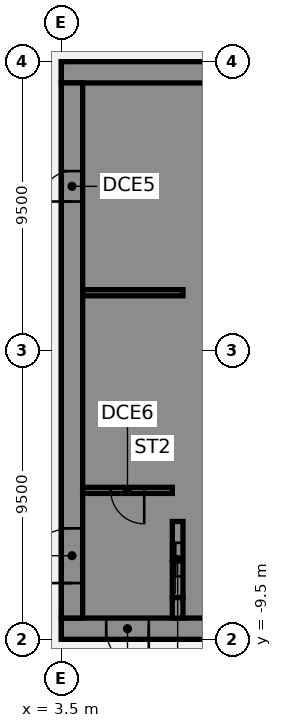
"""IFC4 building model, lengths in metres.
Left out: names, types, materials, properties, quantities, classifications, styles, units other than length and angle.
Written with IfcOpenShell. Run it as: python <this file> out.ifc"""

import sys

from ifc_helpers import new_model, si_unit, direction, frame, frame_2d, origin, place, context, subcontext, project, spatial, polyline, rectangle, outline, extrude, element, fill, save


model = new_model("IFC4")
c1 = context("Model", 3, precision=1e-05, world=origin(), true_north=direction((0.0, 1.0)))
c2 = subcontext(c1, "Body", "Model", "MODEL_VIEW")
j1 = project(units=[si_unit("LENGTHUNIT", "METRE"), si_unit("PLANEANGLEUNIT", "RADIAN")], contexts=[c1])
p1 = place(None, origin())
s1 = spatial("IfcSite", under=j1, at=p1, CompositionType="ELEMENT")
p2 = place(p1, origin())
s2 = spatial("IfcBuilding", under=s1, at=p2, CompositionType="ELEMENT")
p3 = place(p2, frame((0.0, 0.0, 67.75)))
s3 = spatial("IfcBuildingStorey", under=s2, at=p3, CompositionType="ELEMENT", Elevation=67.75)
p4 = place(p3, frame((16.5, -9.15, 0.0), z_axis=(0.0, 0.0, 1.0), x_axis=(-1.0, 0.0, 0.0)))
e1 = element("IfcWall", 1, at=p4, inside=s3, PredefinedType="SHEAR", context=c2, shape_type="SweptSolid", body=[
    extrude(rectangle(XDim=13.0, YDim=0.7, at=frame_2d((6.5, 0.0))), origin(), (0.0, 0.0, 1.0), 3.61),
])
p5 = place(p4, frame((4.15, 0.0, 0.0)))
e2 = element("IfcOpeningElement", 2, at=p5, cuts=e1, PredefinedType="OPENING", context=c2, shape_type="SweptSolid", body=[
    extrude(rectangle(XDim=1.4, YDim=2.1, at=frame_2d((0.7, 1.05))), frame((0.0, 0.36, 0.0), z_axis=(0.0, -1.0, 0.0), x_axis=(1.0, 0.0, 0.0)), (0.0, 0.0, 1.0), 0.72),
])
p6 = place(p4, frame((10.125, 0.0, 0.0)))
e3 = element("IfcOpeningElement", 3, at=p6, cuts=e1, PredefinedType="OPENING", context=c2, shape_type="SweptSolid", body=[
    extrude(rectangle(XDim=1.4, YDim=2.1, at=frame_2d((0.7, 1.05))), frame((0.0, 0.36, 0.0), z_axis=(0.0, -1.0, 0.0), x_axis=(1.0, 0.0, 0.0)), (0.0, 0.0, 1.0), 0.72),
])
p7 = place(p3, frame((16.5, 9.15, 0.0), z_axis=(0.0, 0.0, 1.0), x_axis=(-1.0, 0.0, 0.0)))
e4 = element("IfcWall", 4, at=p7, inside=s3, PredefinedType="SHEAR", context=c2, shape_type="SweptSolid", body=[
    extrude(rectangle(XDim=13.0, YDim=0.7, at=frame_2d((6.5, 0.0))), origin(), (0.0, 0.0, 1.0), 3.61),
])
p8 = place(p3, origin())
e5 = element("IfcWall", 5, at=p8, inside=s3, PredefinedType="SHEAR", context=c2, shape_type="SweptSolid", body=[
    extrude(outline(polyline([(9.8, -5.375), (7.5, -5.375), (7.5, -2.875), (9.8, -2.875), (9.8, -2.625), (7.5, -2.625), (7.5, -0.125), (9.8, -0.125), (9.8, 0.125), (7.5, 0.125), (7.5, 2.625), (9.8, 2.625), (9.8, 2.875), (7.5, 2.875), (7.5, 5.375), (9.8, 5.375), (9.8, 5.625), (7.5, 5.625), (7.5, 8.125), (9.8, 8.125), (9.8, 8.8), (7.5, 8.8), (7.15, 8.8), (7.15, -5.625), (7.5, -5.625), (9.8, -5.625), (9.8, -5.375)])), origin(), (0.0, 0.0, 1.0), 3.61),
])
p9 = place(p3, origin())
e6 = element("IfcWall", 6, at=p9, inside=s3, PredefinedType="SHEAR", context=c2, shape_type="SweptSolid", body=[
    extrude(outline(polyline([(7.5, -8.125), (7.5, -8.8), (9.8, -8.8), (9.8, -8.125), (9.8, -5.625), (9.55, -5.625), (9.55, -8.125), (7.5, -8.125)])), origin(), (0.0, 0.0, 1.0), 3.61),
])
p10 = place(p3, frame((7.325, -8.8, 0.0), z_axis=(0.0, 0.0, 1.0), x_axis=(0.0, 1.0, 0.0)))
e7 = element("IfcWall", 7, at=p10, inside=s3, PredefinedType="SHEAR", context=c2, shape_type="SweptSolid", body=[
    extrude(rectangle(XDim=0.675, YDim=0.35, at=frame_2d((0.337, 0.0))), origin(), (0.0, 0.0, 1.0), 3.61),
])
p11 = place(p3, frame((7.5, 1.9, 0.0), z_axis=(0.0, 0.0, 1.0), x_axis=(-1.0, 0.0, 0.0)))
e8 = element("IfcWall", 8, at=p11, inside=s3, PredefinedType="SHEAR", context=c2, shape_type="SweptSolid", body=[
    extrude(rectangle(XDim=3.3, YDim=0.2, at=frame_2d((1.65, 0.0))), origin(), (0.0, 0.0, 1.0), 3.61),
])
p12 = place(p3, frame((7.325, -8.125, 0.0), z_axis=(0.0, 0.0, 1.0), x_axis=(0.0, 1.0, 0.0)))
e9 = element("IfcWall", 9, at=p12, inside=s3, PredefinedType="SHEAR", context=c2, shape_type="SweptSolid", body=[
    extrude(rectangle(XDim=2.5, YDim=0.35, at=frame_2d((1.25, 0.0))), origin(), (0.0, 0.0, 1.0), 3.61),
])
p13 = place(p12, frame((0.7, 0.0, 0.0)))
e10 = element("IfcOpeningElement", 10, at=p13, cuts=e9, PredefinedType="OPENING", context=c2, shape_type="SweptSolid", body=[
    extrude(rectangle(XDim=1.1, YDim=2.1, at=frame_2d((0.55, 1.05))), frame((0.0, 0.185, 0.0), z_axis=(0.0, -1.0, 0.0), x_axis=(1.0, 0.0, 0.0)), (0.0, 0.0, 1.0), 0.37),
])
p14 = place(p3, frame((3.85, -8.8, 0.0), z_axis=(0.0, 0.0, 1.0), x_axis=(0.0, 1.0, 0.0)))
e11 = element("IfcWall", 11, at=p14, inside=s3, PredefinedType="SHEAR", context=c2, shape_type="SweptSolid", body=[
    extrude(rectangle(XDim=17.6, YDim=0.7, at=frame_2d((8.8, 0.0))), origin(), (0.0, 0.0, 1.0), 3.61),
])
p15 = place(p14, frame((1.15, 0.0, 0.0)))
e12 = element("IfcOpeningElement", 12, at=p15, cuts=e11, PredefinedType="OPENING", context=c2, shape_type="SweptSolid", body=[
    extrude(rectangle(XDim=1.8, YDim=2.1, at=frame_2d((0.9, 1.05))), frame((0.0, 0.36, 0.0), z_axis=(0.0, -1.0, 0.0), x_axis=(1.0, 0.0, 0.0)), (0.0, 0.0, 1.0), 0.72),
])
p16 = place(p14, frame((13.7, 0.0, 0.0)))
e13 = element("IfcOpeningElement", 13, at=p16, cuts=e11, PredefinedType="OPENING", context=c2, shape_type="SweptSolid", body=[
    extrude(rectangle(XDim=1.0, YDim=2.1, at=frame_2d((0.5, 1.05))), frame((0.0, 0.36, 0.0), z_axis=(0.0, -1.0, 0.0), x_axis=(1.0, 0.0, 0.0)), (0.0, 0.0, 1.0), 0.72),
])
p17 = place(p3, frame((7.15, -4.6, 0.0), z_axis=(0.0, 0.0, 1.0), x_axis=(-1.0, 0.0, 0.0)))
e14 = element("IfcWall", 14, at=p17, inside=s3, PredefinedType="SHEAR", context=c2, shape_type="SweptSolid", body=[
    extrude(rectangle(XDim=2.95, YDim=0.2, at=frame_2d((1.475, 0.0))), origin(), (0.0, 0.0, 1.0), 3.61),
])
p18 = place(p17, frame((0.925, 0.0, 0.0)))
e15 = element("IfcOpeningElement", 15, at=p18, cuts=e14, PredefinedType="OPENING", context=c2, shape_type="SweptSolid", body=[
    extrude(rectangle(XDim=1.1, YDim=2.1, at=frame_2d((0.55, 1.05))), frame((0.0, 0.11, 0.0), z_axis=(0.0, -1.0, 0.0), x_axis=(1.0, 0.0, 0.0)), (0.0, 0.0, 1.0), 0.22),
])
p19 = place(p6, origin())
e16 = element("IfcDoor", 16, at=p19, inside=s3, OperationType="SINGLE_SWING_LEFT", PredefinedType="DOOR", context=c2, shape_type="SweptSolid", body=[
    extrude(rectangle(XDim=1.4, YDim=2.1, at=frame_2d((0.7, 1.05))), frame((0.0, 0.025, 0.0), z_axis=(0.0, -1.0, 0.0), x_axis=(1.0, 0.0, 0.0)), (0.0, 0.0, 1.0), 0.05),
])
fill(e3, e16)
p20 = place(p15, origin())
e17 = element("IfcDoor", 17, at=p20, inside=s3, OperationType="SINGLE_SWING_LEFT", PredefinedType="DOOR", context=c2, shape_type="SweptSolid", body=[
    extrude(rectangle(XDim=1.8, YDim=2.1, at=frame_2d((0.9, 1.05))), frame((0.0, 0.025, 0.0), z_axis=(0.0, -1.0, 0.0), x_axis=(1.0, 0.0, 0.0)), (0.0, 0.0, 1.0), 0.05),
])
fill(e12, e17)
p21 = place(p16, origin())
e18 = element("IfcDoor", 18, at=p21, inside=s3, OperationType="SINGLE_SWING_LEFT", PredefinedType="DOOR", context=c2, shape_type="SweptSolid", body=[
    extrude(rectangle(XDim=1.0, YDim=2.1, at=frame_2d((0.5, 1.05))), frame((0.0, 0.025, 0.0), z_axis=(0.0, -1.0, 0.0), x_axis=(1.0, 0.0, 0.0)), (0.0, 0.0, 1.0), 0.05),
])
fill(e13, e18)
p22 = place(p18, origin())
e19 = element("IfcDoor", 19, at=p22, inside=s3, OperationType="SINGLE_SWING_LEFT", PredefinedType="DOOR", context=c2, shape_type="SweptSolid", body=[
    extrude(rectangle(XDim=1.1, YDim=2.1, at=frame_2d((0.55, 1.05))), frame((0.0, 0.025, 0.0), z_axis=(0.0, -1.0, 0.0), x_axis=(1.0, 0.0, 0.0)), (0.0, 0.0, 1.0), 0.05),
])
fill(e15, e19)
p23 = place(p13, origin())
e20 = element("IfcDoor", 20, at=p23, inside=s3, OperationType="SLIDING_TO_LEFT", PredefinedType="DOOR", context=c2, shape_type="SweptSolid", body=[
    extrude(rectangle(XDim=1.1, YDim=2.1, at=frame_2d((0.55, 1.05))), frame((0.0, 0.025, 0.0), z_axis=(0.0, -1.0, 0.0), x_axis=(1.0, 0.0, 0.0)), (0.0, 0.0, 1.0), 0.05),
])
fill(e10, e20)
save(model, sys.argv[1])
